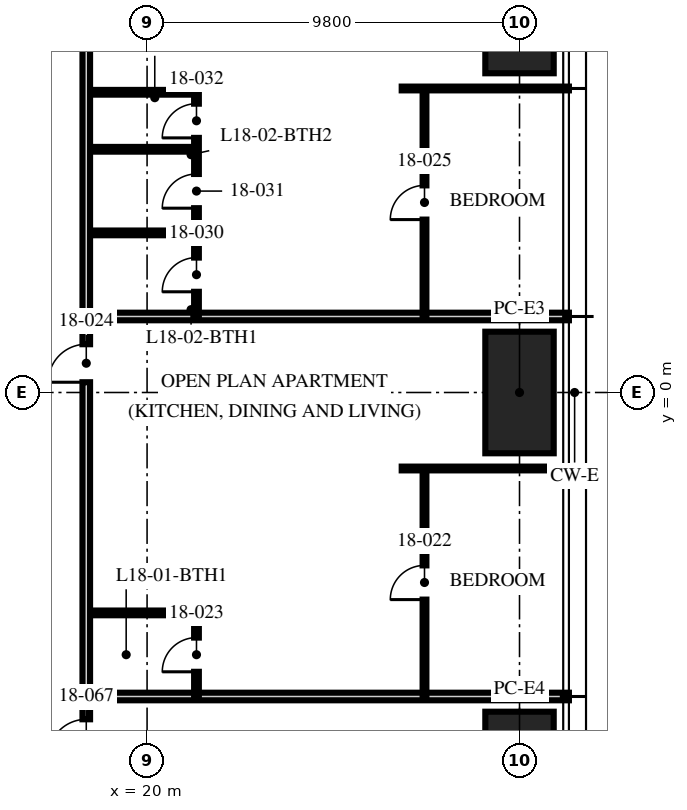
"""IFC4 building model, lengths in metres.
Left out: names, types, materials, properties, quantities, classifications, styles, units other than length and angle.
Written with IfcOpenShell. Run it as: python <this file> out.ifc"""

import sys

from ifc_helpers import new_model, si_unit, direction, frame, frame_2d, origin, origin_2d, place, context, subcontext, project, spatial, rectangle, hollow_rectangle, extrude, element, fill, save


model = new_model("IFC4")
c1 = context("Model", 3, precision=1e-05, world=origin(), true_north=direction((0.0, 1.0)))
c2 = subcontext(c1, "Body", "Model", "MODEL_VIEW")
j1 = project(units=[si_unit("LENGTHUNIT", "METRE"), si_unit("PLANEANGLEUNIT", "RADIAN")], contexts=[c1])
p1 = place(None, origin())
s1 = spatial("IfcSite", under=j1, at=p1, CompositionType="ELEMENT")
p2 = place(p1, origin())
s2 = spatial("IfcBuilding", under=s1, at=p2, CompositionType="ELEMENT")
p3 = place(p2, frame((0.0, 0.0, 73.5)))
s3 = spatial("IfcBuildingStorey", under=s2, at=p3, CompositionType="ELEMENT", Elevation=73.5)
for number, where, z_axis, x_axis in (
    (1, (29.8, 10.0, 0.0), (0.0, 0.0, 1.0), (0.0, 1.0, 0.0)),
    (2, (29.8, 0.0, 0.0), (0.0, 0.0, 1.0), (0.0, 1.0, 0.0)),
    (3, (29.8, -10.0, 0.0), (0.0, 0.0, 1.0), (0.0, 1.0, 0.0)),
):
    element("IfcColumn", number, at=place(p3, frame(where, z_axis=z_axis, x_axis=x_axis)), inside=s3, PredefinedType="COLUMN", context=c2, shape_type="SweptSolid", body=[
        extrude(hollow_rectangle(XDim=3.2, YDim=1.8, WallThickness=0.2, at=origin_2d()), origin(), (0.0, 0.0, 1.0), 3.75),
    ])
p4 = place(p3, frame((18.5, -8.0, 0.0), z_axis=(0.0, 0.0, 1.0), x_axis=(1.0, 0.0, 0.0)))
e4 = element("IfcWall", 4, at=p4, inside=s3, PredefinedType="PARTITIONING", context=c2, shape_type="SweptSolid", body=[
    extrude(rectangle(XDim=12.6, YDim=0.2, at=frame_2d((6.3, 0.0))), origin(), (0.0, 0.0, 1.0), 2.71),
])
p5 = place(p3, frame((26.7, -2.0, 0.0), z_axis=(0.0, 0.0, 1.0), x_axis=(1.0, 0.0, 0.0)))
e5 = element("IfcWall", 5, at=p5, inside=s3, PredefinedType="PARTITIONING", context=c2, shape_type="SweptSolid", body=[
    extrude(rectangle(XDim=4.4, YDim=0.1, at=frame_2d((2.2, 0.0))), origin(), (0.0, 0.0, 1.0), 2.71),
])
p6 = place(p3, frame((18.5, 2.0, 0.0), z_axis=(0.0, 0.0, 1.0), x_axis=(1.0, 0.0, 0.0)))
e6 = element("IfcWall", 6, at=p6, inside=s3, PredefinedType="PARTITIONING", context=c2, shape_type="SweptSolid", body=[
    extrude(rectangle(XDim=12.6, YDim=0.2, at=frame_2d((6.3, 0.0))), origin(), (0.0, 0.0, 1.0), 2.71),
])
p7 = place(p3, frame((26.7, 8.0, 0.0), z_axis=(0.0, 0.0, 1.0), x_axis=(1.0, 0.0, 0.0)))
e7 = element("IfcWall", 7, at=p7, inside=s3, PredefinedType="PARTITIONING", context=c2, shape_type="SweptSolid", body=[
    extrude(rectangle(XDim=4.4, YDim=0.1, at=frame_2d((2.2, 0.0))), origin(), (0.0, 0.0, 1.0), 2.71),
])
p8 = place(p3, frame((27.3, -8.0, 0.0), z_axis=(0.0, 0.0, 1.0), x_axis=(0.0, 1.0, 0.0)))
e8 = element("IfcWall", 8, at=p8, inside=s3, PredefinedType="PARTITIONING", context=c2, shape_type="SweptSolid", body=[
    extrude(rectangle(XDim=6.0, YDim=0.1, at=frame_2d((3.0, 0.0))), origin(), (0.0, 0.0, 1.0), 2.61),
])
p9 = place(p8, frame((2.55, 0.0, 0.0)))
e9 = element("IfcOpeningElement", 9, at=p9, cuts=e8, PredefinedType="OPENING", context=c2, shape_type="SweptSolid", body=[
    extrude(rectangle(XDim=0.9, YDim=2.1, at=frame_2d((0.45, 1.05))), frame((0.0, 0.06, 0.0), z_axis=(0.0, -1.0, 0.0), x_axis=(1.0, 0.0, 0.0)), (0.0, 0.0, 1.0), 0.12),
])
p10 = place(p3, frame((21.3, -8.0, 0.0), z_axis=(0.0, 0.0, 1.0), x_axis=(0.0, 1.0, 0.0)))
e10 = element("IfcWall", 10, at=p10, inside=s3, PredefinedType="PARTITIONING", context=c2, shape_type="SweptSolid", body=[
    extrude(rectangle(XDim=2.2, YDim=0.125, at=frame_2d((1.1, 0.0))), origin(), (0.0, 0.0, 1.0), 3.5),
])
p11 = place(p10, frame((0.65, 0.0, 0.0)))
e11 = element("IfcOpeningElement", 11, at=p11, cuts=e10, PredefinedType="OPENING", context=c2, shape_type="SweptSolid", body=[
    extrude(rectangle(XDim=0.9, YDim=2.1, at=frame_2d((0.45, 1.05))), frame((0.0, 0.073, 0.0), z_axis=(0.0, -1.0, 0.0), x_axis=(1.0, 0.0, 0.0)), (0.0, 0.0, 1.0), 0.145),
])
p12 = place(p3, frame((18.5, -5.8, 0.0), z_axis=(0.0, 0.0, 1.0), x_axis=(1.0, 0.0, 0.0)))
e12 = element("IfcWall", 12, at=p12, inside=s3, PredefinedType="PARTITIONING", context=c2, shape_type="SweptSolid", body=[
    extrude(rectangle(XDim=2.8, YDim=0.125, at=frame_2d((1.4, 0.0))), origin(), (0.0, 0.0, 1.0), 3.5),
])
p13 = place(p3, frame((27.3, 2.0, 0.0), z_axis=(0.0, 0.0, 1.0), x_axis=(0.0, 1.0, 0.0)))
e13 = element("IfcWall", 13, at=p13, inside=s3, PredefinedType="PARTITIONING", context=c2, shape_type="SweptSolid", body=[
    extrude(rectangle(XDim=6.0, YDim=0.1, at=frame_2d((3.0, 0.0))), origin(), (0.0, 0.0, 1.0), 2.61),
])
p14 = place(p13, frame((2.55, 0.0, 0.0)))
e14 = element("IfcOpeningElement", 14, at=p14, cuts=e13, PredefinedType="OPENING", context=c2, shape_type="SweptSolid", body=[
    extrude(rectangle(XDim=0.9, YDim=2.1, at=frame_2d((0.45, 1.05))), frame((0.0, 0.06, 0.0), z_axis=(0.0, -1.0, 0.0), x_axis=(1.0, 0.0, 0.0)), (0.0, 0.0, 1.0), 0.12),
])
p15 = place(p3, frame((21.3, 2.0, 0.0), z_axis=(0.0, 0.0, 1.0), x_axis=(0.0, 1.0, 0.0)))
e15 = element("IfcWall", 15, at=p15, inside=s3, PredefinedType="PARTITIONING", context=c2, shape_type="SweptSolid", body=[
    extrude(rectangle(XDim=5.9, YDim=0.125, at=frame_2d((2.95, 0.0))), origin(), (0.0, 0.0, 1.0), 2.61),
])
p16 = place(p15, frame((0.65, 0.0, 0.0)))
e16 = element("IfcOpeningElement", 16, at=p16, cuts=e15, PredefinedType="OPENING", context=c2, shape_type="SweptSolid", body=[
    extrude(rectangle(XDim=0.9, YDim=2.1, at=frame_2d((0.45, 1.05))), frame((0.0, 0.073, 0.0), z_axis=(0.0, -1.0, 0.0), x_axis=(1.0, 0.0, 0.0)), (0.0, 0.0, 1.0), 0.145),
])
p17 = place(p15, frame((2.85, 0.0, 0.0)))
e17 = element("IfcOpeningElement", 17, at=p17, cuts=e15, PredefinedType="OPENING", context=c2, shape_type="SweptSolid", body=[
    extrude(rectangle(XDim=0.9, YDim=2.1, at=frame_2d((0.45, 1.05))), frame((0.0, 0.073, 0.0), z_axis=(0.0, -1.0, 0.0), x_axis=(1.0, 0.0, 0.0)), (0.0, 0.0, 1.0), 0.145),
])
p18 = place(p15, frame((4.7, 0.0, 0.0)))
e18 = element("IfcOpeningElement", 18, at=p18, cuts=e15, PredefinedType="OPENING", context=c2, shape_type="SweptSolid", body=[
    extrude(rectangle(XDim=0.9, YDim=2.1, at=frame_2d((0.45, 1.05))), frame((0.0, 0.073, 0.0), z_axis=(0.0, -1.0, 0.0), x_axis=(1.0, 0.0, 0.0)), (0.0, 0.0, 1.0), 0.145),
])
for number, where, z_axis, x_axis in (
    (19, (18.5, 4.2, 0.0), (0.0, 0.0, 1.0), (1.0, 0.0, 0.0)),
    (20, (18.5, 6.4, 0.0), (0.0, 0.0, 1.0), (1.0, 0.0, 0.0)),
    (21, (18.5, 7.9, 0.0), (0.0, 0.0, 1.0), (1.0, 0.0, 0.0)),
):
    element("IfcWall", number, at=place(p3, frame(where, z_axis=z_axis, x_axis=x_axis)), inside=s3, PredefinedType="PARTITIONING", context=c2, shape_type="SweptSolid", body=[
        extrude(rectangle(XDim=2.8, YDim=0.125, at=frame_2d((1.4, 0.0))), origin(), (0.0, 0.0, 1.0), 3.5),
    ])
p19 = place(p3, frame((18.4, -18.3, 0.0), z_axis=(0.0, 0.0, 1.0), x_axis=(0.0, 1.0, 0.0)))
e22 = element("IfcWall", 22, at=p19, inside=s3, PredefinedType="PARTITIONING", context=c2, shape_type="SweptSolid", body=[
    extrude(rectangle(XDim=36.6, YDim=0.2, at=frame_2d((18.3, 0.0))), origin(), (0.0, 0.0, 1.0), 2.3),
])
p20 = place(p19, frame((18.57, 0.0, 0.0)))
e23 = element("IfcOpeningElement", 23, at=p20, cuts=e22, PredefinedType="OPENING", context=c2, shape_type="SweptSolid", body=[
    extrude(rectangle(XDim=1.0, YDim=2.2, at=frame_2d((0.5, 1.1))), frame((0.0, 0.11, 0.0), z_axis=(0.0, -1.0, 0.0), x_axis=(1.0, 0.0, 0.0)), (0.0, 0.0, 1.0), 0.22),
])
p21 = place(p19, frame((8.7, 0.0, 0.0)))
e24 = element("IfcOpeningElement", 24, at=p21, cuts=e22, PredefinedType="OPENING", context=c2, shape_type="SweptSolid", body=[
    extrude(rectangle(XDim=1.0, YDim=2.2, at=frame_2d((0.5, 1.1))), frame((0.0, 0.11, 0.0), z_axis=(0.0, -1.0, 0.0), x_axis=(1.0, 0.0, 0.0)), (0.0, 0.0, 1.0), 0.22),
])
p22 = place(p9, origin())
e25 = element("IfcDoor", 25, at=p22, inside=s3, OperationType="SINGLE_SWING_LEFT", PredefinedType="DOOR", context=c2, shape_type="SweptSolid", body=[
    extrude(rectangle(XDim=0.9, YDim=2.1, at=frame_2d((0.45, 1.05))), frame((0.0, 0.025, 0.0), z_axis=(0.0, -1.0, 0.0), x_axis=(1.0, 0.0, 0.0)), (0.0, 0.0, 1.0), 0.05),
])
fill(e9, e25)
p23 = place(p11, origin())
e26 = element("IfcDoor", 26, at=p23, inside=s3, OperationType="SINGLE_SWING_LEFT", PredefinedType="DOOR", context=c2, shape_type="SweptSolid", body=[
    extrude(rectangle(XDim=0.9, YDim=2.1, at=frame_2d((0.45, 1.05))), frame((0.0, 0.025, 0.0), z_axis=(0.0, -1.0, 0.0), x_axis=(1.0, 0.0, 0.0)), (0.0, 0.0, 1.0), 0.05),
])
fill(e11, e26)
p24 = place(p20, origin())
e27 = element("IfcDoor", 27, at=p24, inside=s3, OperationType="SINGLE_SWING_LEFT", PredefinedType="DOOR", context=c2, shape_type="SweptSolid", body=[
    extrude(rectangle(XDim=1.0, YDim=2.2, at=frame_2d((0.5, 1.1))), frame((0.0, 0.025, 0.0), z_axis=(0.0, -1.0, 0.0), x_axis=(1.0, 0.0, 0.0)), (0.0, 0.0, 1.0), 0.05),
])
fill(e23, e27)
p25 = place(p14, origin())
e28 = element("IfcDoor", 28, at=p25, inside=s3, OperationType="SINGLE_SWING_LEFT", PredefinedType="DOOR", context=c2, shape_type="SweptSolid", body=[
    extrude(rectangle(XDim=0.9, YDim=2.1, at=frame_2d((0.45, 1.05))), frame((0.0, 0.025, 0.0), z_axis=(0.0, -1.0, 0.0), x_axis=(1.0, 0.0, 0.0)), (0.0, 0.0, 1.0), 0.05),
])
fill(e14, e28)
p26 = place(p16, origin())
e29 = element("IfcDoor", 29, at=p26, inside=s3, OperationType="SINGLE_SWING_LEFT", PredefinedType="DOOR", context=c2, shape_type="SweptSolid", body=[
    extrude(rectangle(XDim=0.9, YDim=2.1, at=frame_2d((0.45, 1.05))), frame((0.0, 0.025, 0.0), z_axis=(0.0, -1.0, 0.0), x_axis=(1.0, 0.0, 0.0)), (0.0, 0.0, 1.0), 0.05),
])
fill(e16, e29)
p27 = place(p17, origin())
e30 = element("IfcDoor", 30, at=p27, inside=s3, OperationType="SINGLE_SWING_LEFT", PredefinedType="DOOR", context=c2, shape_type="SweptSolid", body=[
    extrude(rectangle(XDim=0.9, YDim=2.1, at=frame_2d((0.45, 1.05))), frame((0.0, 0.025, 0.0), z_axis=(0.0, -1.0, 0.0), x_axis=(1.0, 0.0, 0.0)), (0.0, 0.0, 1.0), 0.05),
])
fill(e17, e30)
p28 = place(p18, origin())
e31 = element("IfcDoor", 31, at=p28, inside=s3, OperationType="SINGLE_SWING_LEFT", PredefinedType="DOOR", context=c2, shape_type="SweptSolid", body=[
    extrude(rectangle(XDim=0.9, YDim=2.1, at=frame_2d((0.45, 1.05))), frame((0.0, 0.025, 0.0), z_axis=(0.0, -1.0, 0.0), x_axis=(1.0, 0.0, 0.0)), (0.0, 0.0, 1.0), 0.05),
])
fill(e18, e31)
p29 = place(p21, origin())
e32 = element("IfcDoor", 32, at=p29, inside=s3, OperationType="SINGLE_SWING_LEFT", PredefinedType="DOOR", context=c2, shape_type="SweptSolid", body=[
    extrude(rectangle(XDim=1.0, YDim=2.2, at=frame_2d((0.5, 1.1))), frame((0.0, 0.025, 0.0), z_axis=(0.0, -1.0, 0.0), x_axis=(1.0, 0.0, 0.0)), (0.0, 0.0, 1.0), 0.05),
])
fill(e24, e32)
save(model, sys.argv[1])
